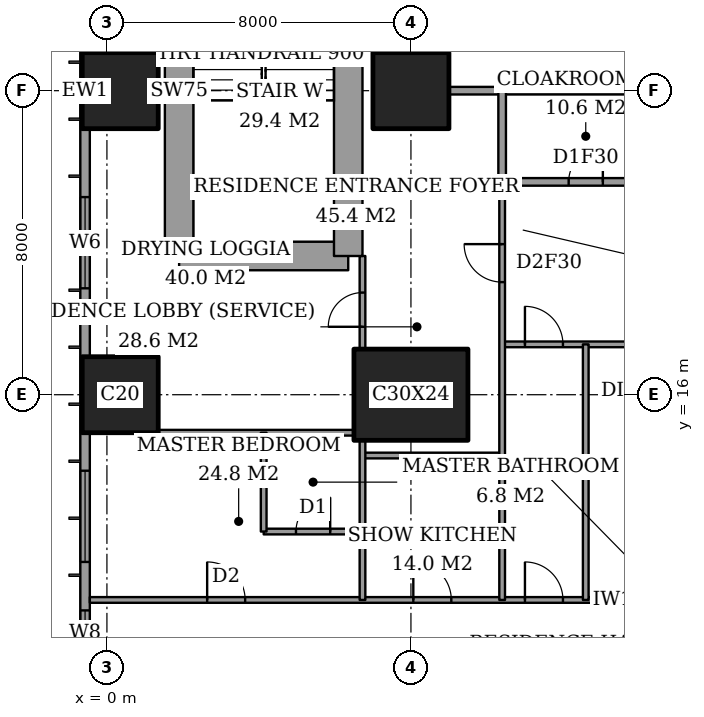
"""IFC4 building model, lengths in metres.
Left out: names, types, materials, properties, quantities, classifications, styles, units other than length and angle.
Written with IfcOpenShell. Run it as: python <this file> out.ifc"""

import sys

from ifc_helpers import new_model, si_unit, direction, frame, frame_2d, origin, origin_2d, place, context, subcontext, project, spatial, rectangle, extrude, element, fill, save


model = new_model("IFC4")
c1 = context("Model", 3, precision=1e-05, world=origin(), true_north=direction((0.0, 1.0)))
c2 = subcontext(c1, "Body", "Model", "MODEL_VIEW")
j1 = project(units=[si_unit("LENGTHUNIT", "METRE"), si_unit("PLANEANGLEUNIT", "RADIAN")], contexts=[c1])
p1 = place(None, origin())
s1 = spatial("IfcSite", under=j1, at=p1, CompositionType="ELEMENT")
p2 = place(p1, origin())
s2 = spatial("IfcBuilding", under=s1, at=p2, CompositionType="ELEMENT")
p3 = place(p2, frame((0.0, 0.0, 33.2)))
s3 = spatial("IfcBuildingStorey", under=s2, at=p3, CompositionType="ELEMENT", Elevation=33.2)
for number, where, z_axis, x_axis in (
    (1, (0.35, 16.0, 0.0), (0.0, 0.0, 1.0), (1.0, 0.0, 0.0)),
    (2, (0.35, 24.0, 0.0), (0.0, 0.0, 1.0), (1.0, 0.0, 0.0)),
):
    element("IfcColumn", number, at=place(p3, frame(where, z_axis=z_axis, x_axis=x_axis)), inside=s3, PredefinedType="COLUMN", context=c2, shape_type="SweptSolid", body=[
        extrude(rectangle(XDim=2.0, YDim=2.0, at=origin_2d()), origin(), (0.0, 0.0, 1.0), 3.6),
    ])
p4 = place(p3, frame((8.0, 16.0, 0.0), z_axis=(0.0, 0.0, 1.0), x_axis=(1.0, 0.0, 0.0)))
e3 = element("IfcColumn", 3, at=p4, inside=s3, PredefinedType="COLUMN", context=c2, shape_type="SweptSolid", body=[
    extrude(rectangle(XDim=3.0, YDim=2.4, at=origin_2d()), origin(), (0.0, 0.0, 1.0), 3.6),
])
p5 = place(p3, frame((8.0, 24.0, 0.0), z_axis=(0.0, 0.0, 1.0), x_axis=(1.0, 0.0, 0.0)))
e4 = element("IfcColumn", 4, at=p5, inside=s3, PredefinedType="COLUMN", context=c2, shape_type="SweptSolid", body=[
    extrude(rectangle(XDim=2.0, YDim=2.0, at=origin_2d()), origin(), (0.0, 0.0, 1.0), 3.6),
])
p6 = place(p3, frame((1.9, 19.65, 0.0), z_axis=(0.0, 0.0, 1.0), x_axis=(1.0, 0.0, 0.0)))
e5 = element("IfcWall", 5, at=p6, inside=s3, PredefinedType="SHEAR", context=c2, shape_type="SweptSolid", body=[
    extrude(rectangle(XDim=4.45, YDim=0.75, at=frame_2d((2.225, 0.0))), origin(), (0.0, 0.0, 1.0), 3.6),
])
p7 = place(p3, frame((6.35, 19.65, 0.0), z_axis=(0.0, 0.0, 1.0), x_axis=(0.0, 1.0, 0.0)))
e6 = element("IfcWall", 6, at=p7, inside=s3, PredefinedType="SHEAR", context=c2, shape_type="SweptSolid", body=[
    extrude(rectangle(XDim=8.7, YDim=0.75, at=frame_2d((4.35, 0.0))), origin(), (0.0, 0.0, 1.0), 3.6),
])
p8 = place(p7, frame((6.725, 0.0, 0.0)))
e7 = element("IfcOpeningElement", 7, at=p8, cuts=e6, PredefinedType="OPENING", context=c2, shape_type="SweptSolid", body=[
    extrude(rectangle(XDim=1.0, YDim=2.1, at=frame_2d((0.5, 1.05))), frame((0.0, 0.385, 0.0), z_axis=(0.0, -1.0, 0.0), x_axis=(1.0, 0.0, 0.0)), (0.0, 0.0, 1.0), 0.77),
])
p9 = place(p3, frame((1.9, 28.35, 0.0), z_axis=(0.0, 0.0, 1.0), x_axis=(0.0, -1.0, 0.0)))
e8 = element("IfcWall", 8, at=p9, inside=s3, PredefinedType="SHEAR", context=c2, shape_type="SweptSolid", body=[
    extrude(rectangle(XDim=8.7, YDim=0.75, at=frame_2d((4.35, 0.0))), origin(), (0.0, 0.0, 1.0), 3.6),
])
p10 = place(p3, frame((-0.575, 44.825, 0.0), z_axis=(0.0, 0.0, 1.0), x_axis=(0.0, -1.0, 0.0)))
e9 = element("IfcWall", 9, at=p10, inside=s3, PredefinedType="SOLIDWALL", context=c2, shape_type="SweptSolid", body=[
    extrude(rectangle(XDim=41.65, YDim=0.25, at=frame_2d((20.825, 0.0))), origin(), (0.0, 0.0, 1.0), 3.6),
])
p11 = place(p10, frame((0.775, 0.0, 0.6)))
e10 = element("IfcOpeningElement", 10, at=p11, cuts=e9, PredefinedType="OPENING", context=c2, shape_type="SweptSolid", body=[
    extrude(rectangle(XDim=2.4, YDim=2.0, at=frame_2d((1.2, 1.0))), frame((0.0, 0.135, 0.0), z_axis=(0.0, -1.0, 0.0), x_axis=(1.0, 0.0, 0.0)), (0.0, 0.0, 1.0), 0.27),
])
p12 = place(p10, frame((6.225, 0.0, 0.6)))
e11 = element("IfcOpeningElement", 11, at=p12, cuts=e9, PredefinedType="OPENING", context=c2, shape_type="SweptSolid", body=[
    extrude(rectangle(XDim=1.2, YDim=2.0, at=frame_2d((0.6, 1.0))), frame((0.0, 0.135, 0.0), z_axis=(0.0, -1.0, 0.0), x_axis=(1.0, 0.0, 0.0)), (0.0, 0.0, 1.0), 0.27),
])
p13 = place(p10, frame((8.625, 0.0, 0.6)))
e12 = element("IfcOpeningElement", 12, at=p13, cuts=e9, PredefinedType="OPENING", context=c2, shape_type="SweptSolid", body=[
    extrude(rectangle(XDim=2.4, YDim=2.0, at=frame_2d((1.2, 1.0))), frame((0.0, 0.135, 0.0), z_axis=(0.0, -1.0, 0.0), x_axis=(1.0, 0.0, 0.0)), (0.0, 0.0, 1.0), 0.27),
])
p14 = place(p10, frame((15.625, 0.0, 0.6)))
e13 = element("IfcOpeningElement", 13, at=p14, cuts=e9, PredefinedType="OPENING", context=c2, shape_type="SweptSolid", body=[
    extrude(rectangle(XDim=2.4, YDim=2.0, at=frame_2d((1.2, 1.0))), frame((0.0, 0.135, 0.0), z_axis=(0.0, -1.0, 0.0), x_axis=(1.0, 0.0, 0.0)), (0.0, 0.0, 1.0), 0.27),
])
p15 = place(p10, frame((23.625, 0.0, 0.6)))
e14 = element("IfcOpeningElement", 14, at=p15, cuts=e9, PredefinedType="OPENING", context=c2, shape_type="SweptSolid", body=[
    extrude(rectangle(XDim=2.4, YDim=2.0, at=frame_2d((1.2, 1.0))), frame((0.0, 0.135, 0.0), z_axis=(0.0, -1.0, 0.0), x_axis=(1.0, 0.0, 0.0)), (0.0, 0.0, 1.0), 0.27),
])
p16 = place(p10, frame((30.825, 0.0, 0.6)))
e15 = element("IfcOpeningElement", 15, at=p16, cuts=e9, PredefinedType="OPENING", context=c2, shape_type="SweptSolid", body=[
    extrude(rectangle(XDim=2.4, YDim=2.0, at=frame_2d((1.2, 1.0))), frame((0.0, 0.135, 0.0), z_axis=(0.0, -1.0, 0.0), x_axis=(1.0, 0.0, 0.0)), (0.0, 0.0, 1.0), 0.27),
])
p17 = place(p10, frame((34.5, 0.0, 0.6)))
e16 = element("IfcOpeningElement", 16, at=p17, cuts=e9, PredefinedType="OPENING", context=c2, shape_type="SweptSolid", body=[
    extrude(rectangle(XDim=1.2, YDim=2.0, at=frame_2d((0.6, 1.0))), frame((0.0, 0.135, 0.0), z_axis=(0.0, -1.0, 0.0), x_axis=(1.0, 0.0, 0.0)), (0.0, 0.0, 1.0), 0.27),
])
p18 = place(p10, frame((38.475, 0.0, 0.6)))
e17 = element("IfcOpeningElement", 17, at=p18, cuts=e9, PredefinedType="OPENING", context=c2, shape_type="SweptSolid", body=[
    extrude(rectangle(XDim=2.4, YDim=2.0, at=frame_2d((1.2, 1.0))), frame((0.0, 0.135, 0.0), z_axis=(0.0, -1.0, 0.0), x_axis=(1.0, 0.0, 0.0)), (0.0, 0.0, 1.0), 0.27),
])
p19 = place(p3, frame((-0.45, 10.6, 0.0), z_axis=(0.0, 0.0, 1.0), x_axis=(1.0, 0.0, 0.0)))
e18 = element("IfcWall", 18, at=p19, inside=s3, PredefinedType="PARTITIONING", context=c2, shape_type="SweptSolid", body=[
    extrude(rectangle(XDim=25.011, YDim=0.15, at=frame_2d((12.505, 0.0))), origin(), (0.0, 0.0, 1.0), 3.35),
])
p20 = place(p19, frame((11.45, 0.0, 0.0)))
e19 = element("IfcOpeningElement", 19, at=p20, cuts=e18, PredefinedType="OPENING", context=c2, shape_type="SweptSolid", body=[
    extrude(rectangle(XDim=1.0, YDim=2.1, at=frame_2d((0.5, 1.05))), frame((0.0, 0.085, 0.0), z_axis=(0.0, -1.0, 0.0), x_axis=(1.0, 0.0, 0.0)), (0.0, 0.0, 1.0), 0.17),
])
p21 = place(p19, frame((3.087, 0.0, 0.0)))
e20 = element("IfcOpeningElement", 20, at=p21, cuts=e18, PredefinedType="OPENING", context=c2, shape_type="SweptSolid", body=[
    extrude(rectangle(XDim=1.0, YDim=2.1, at=frame_2d((0.5, 1.05))), frame((0.0, 0.085, 0.0), z_axis=(0.0, -1.0, 0.0), x_axis=(1.0, 0.0, 0.0)), (0.0, 0.0, 1.0), 0.17),
])
p22 = place(p19, frame((8.512, 0.0, 0.0)))
e21 = element("IfcOpeningElement", 21, at=p22, cuts=e18, PredefinedType="OPENING", context=c2, shape_type="SweptSolid", body=[
    extrude(rectangle(XDim=1.0, YDim=2.1, at=frame_2d((0.5, 1.05))), frame((0.0, 0.085, 0.0), z_axis=(0.0, -1.0, 0.0), x_axis=(1.0, 0.0, 0.0)), (0.0, 0.0, 1.0), 0.17),
])
p23 = place(p19, frame((15.25, 0.0, 0.0)))
e22 = element("IfcOpeningElement", 22, at=p23, cuts=e18, PredefinedType="OPENING", context=c2, shape_type="SweptSolid", body=[
    extrude(rectangle(XDim=1.0, YDim=2.1, at=frame_2d((0.5, 1.05))), frame((0.0, 0.085, 0.0), z_axis=(0.0, -1.0, 0.0), x_axis=(1.0, 0.0, 0.0)), (0.0, 0.0, 1.0), 0.17),
])
p24 = place(p19, frame((21.175, 0.0, 0.0)))
e23 = element("IfcOpeningElement", 23, at=p24, cuts=e18, PredefinedType="OPENING", context=c2, shape_type="SweptSolid", body=[
    extrude(rectangle(XDim=1.0, YDim=2.1, at=frame_2d((0.5, 1.05))), frame((0.0, 0.085, 0.0), z_axis=(0.0, -1.0, 0.0), x_axis=(1.0, 0.0, 0.0)), (0.0, 0.0, 1.0), 0.17),
])
p25 = place(p3, frame((4.125, 12.4, 0.0), z_axis=(0.0, 0.0, 1.0), x_axis=(1.0, 0.0, 0.0)))
e24 = element("IfcWall", 24, at=p25, inside=s3, PredefinedType="PARTITIONING", context=c2, shape_type="SweptSolid", body=[
    extrude(rectangle(XDim=2.6, YDim=0.15, at=frame_2d((1.3, 0.0))), origin(), (0.0, 0.0, 1.0), 3.35),
])
p26 = place(p25, frame((0.85, 0.0, 0.0)))
e25 = element("IfcOpeningElement", 25, at=p26, cuts=e24, PredefinedType="OPENING", context=c2, shape_type="SweptSolid", body=[
    extrude(rectangle(XDim=0.9, YDim=2.1, at=frame_2d((0.45, 1.05))), frame((0.0, 0.085, 0.0), z_axis=(0.0, -1.0, 0.0), x_axis=(1.0, 0.0, 0.0)), (0.0, 0.0, 1.0), 0.17),
])
p27 = place(p3, frame((6.725, 14.4, 0.0), z_axis=(0.0, 0.0, 1.0), x_axis=(1.0, 0.0, 0.0)))
e26 = element("IfcWall", 26, at=p27, inside=s3, PredefinedType="PARTITIONING", context=c2, shape_type="SweptSolid", body=[
    extrude(rectangle(XDim=3.675, YDim=0.15, at=frame_2d((1.837, 0.0))), origin(), (0.0, 0.0, 1.0), 3.35),
])
p28 = place(p3, frame((1.35, 15.0, 0.0), z_axis=(0.0, 0.0, 1.0), x_axis=(1.0, 0.0, 0.0)))
e27 = element("IfcWall", 27, at=p28, inside=s3, PredefinedType="PARTITIONING", context=c2, shape_type="SweptSolid", body=[
    extrude(rectangle(XDim=5.15, YDim=0.15, at=frame_2d((2.575, 0.0))), origin(), (0.0, 0.0, 1.0), 3.35),
])
p29 = place(p3, frame((10.4, 17.325, 0.0), z_axis=(0.0, 0.0, 1.0), x_axis=(1.0, 0.0, 0.0)))
e28 = element("IfcWall", 28, at=p29, inside=s3, PredefinedType="PARTITIONING", context=c2, shape_type="SweptSolid", body=[
    extrude(rectangle(XDim=4.0, YDim=0.15, at=frame_2d((2.0, 0.0))), origin(), (0.0, 0.0, 1.0), 3.35),
])
p30 = place(p29, frame((0.6, 0.0, 0.0)))
e29 = element("IfcOpeningElement", 29, at=p30, cuts=e28, PredefinedType="OPENING", context=c2, shape_type="SweptSolid", body=[
    extrude(rectangle(XDim=1.0, YDim=2.1, at=frame_2d((0.5, 1.05))), frame((0.0, 0.085, 0.0), z_axis=(0.0, -1.0, 0.0), x_axis=(1.0, 0.0, 0.0)), (0.0, 0.0, 1.0), 0.17),
])
p31 = place(p3, frame((10.4, 21.6, 0.0), z_axis=(0.0, 0.0, 1.0), x_axis=(1.0, 0.0, 0.0)))
e30 = element("IfcWall", 30, at=p31, inside=s3, PredefinedType="PARTITIONING", context=c2, shape_type="SweptSolid", body=[
    extrude(rectangle(XDim=4.4, YDim=0.2, at=frame_2d((2.2, 0.0))), origin(), (0.0, 0.0, 1.0), 3.35),
])
p32 = place(p31, frame((1.75, 0.0, 0.0)))
e31 = element("IfcOpeningElement", 31, at=p32, cuts=e30, PredefinedType="OPENING", context=c2, shape_type="SweptSolid", body=[
    extrude(rectangle(XDim=0.9, YDim=2.1, at=frame_2d((0.45, 1.05))), frame((0.0, 0.11, 0.0), z_axis=(0.0, -1.0, 0.0), x_axis=(1.0, 0.0, 0.0)), (0.0, 0.0, 1.0), 0.22),
])
p33 = place(p3, frame((9.0, 24.0, 0.0), z_axis=(0.0, 0.0, 1.0), x_axis=(1.0, 0.0, 0.0)))
e32 = element("IfcWall", 32, at=p33, inside=s3, PredefinedType="PARTITIONING", context=c2, shape_type="SweptSolid", body=[
    extrude(rectangle(XDim=6.0, YDim=0.2, at=frame_2d((3.0, 0.0))), origin(), (0.0, 0.0, 1.0), 3.35),
])
p34 = place(p3, frame((4.125, 12.4, 0.0), z_axis=(0.0, 0.0, 1.0), x_axis=(0.0, 1.0, 0.0)))
e33 = element("IfcWall", 33, at=p34, inside=s3, PredefinedType="PARTITIONING", context=c2, shape_type="SweptSolid", body=[
    extrude(rectangle(XDim=2.6, YDim=0.15, at=frame_2d((1.3, 0.0))), origin(), (0.0, 0.0, 1.0), 3.35),
])
p35 = place(p3, frame((6.725, 10.6, 0.0), z_axis=(0.0, 0.0, 1.0), x_axis=(0.0, 1.0, 0.0)))
e34 = element("IfcWall", 34, at=p35, inside=s3, PredefinedType="PARTITIONING", context=c2, shape_type="SweptSolid", body=[
    extrude(rectangle(XDim=4.2, YDim=0.15, at=frame_2d((2.1, 0.0))), origin(), (0.0, 0.0, 1.0), 3.35),
])
p36 = place(p3, frame((6.725, 17.2, 0.0), z_axis=(0.0, 0.0, 1.0), x_axis=(0.0, 1.0, 0.0)))
e35 = element("IfcWall", 35, at=p36, inside=s3, PredefinedType="PARTITIONING", context=c2, shape_type="SweptSolid", body=[
    extrude(rectangle(XDim=2.45, YDim=0.15, at=frame_2d((1.225, 0.0))), origin(), (0.0, 0.0, 1.0), 3.35),
])
p37 = place(p36, frame((0.587, 0.0, 0.0)))
e36 = element("IfcOpeningElement", 36, at=p37, cuts=e35, PredefinedType="OPENING", context=c2, shape_type="SweptSolid", body=[
    extrude(rectangle(XDim=0.9, YDim=2.1, at=frame_2d((0.45, 1.05))), frame((0.0, 0.085, 0.0), z_axis=(0.0, -1.0, 0.0), x_axis=(1.0, 0.0, 0.0)), (0.0, 0.0, 1.0), 0.17),
])
p38 = place(p3, frame((10.4, 21.6, 0.0), z_axis=(0.0, 0.0, 1.0), x_axis=(0.0, 1.0, 0.0)))
e37 = element("IfcWall", 37, at=p38, inside=s3, PredefinedType="PARTITIONING", context=c2, shape_type="SweptSolid", body=[
    extrude(rectangle(XDim=2.4, YDim=0.2, at=frame_2d((1.2, 0.0))), origin(), (0.0, 0.0, 1.0), 3.35),
])
p39 = place(p3, frame((10.4, 10.6, 0.0), z_axis=(0.0, 0.0, 1.0), x_axis=(0.0, 1.0, 0.0)))
e38 = element("IfcWall", 38, at=p39, inside=s3, PredefinedType="PARTITIONING", context=c2, shape_type="SweptSolid", body=[
    extrude(rectangle(XDim=11.0, YDim=0.15, at=frame_2d((5.5, 0.0))), origin(), (0.0, 0.0, 1.0), 3.35),
])
p40 = place(p39, frame((8.363, 0.0, 0.0)))
e39 = element("IfcOpeningElement", 39, at=p40, cuts=e38, PredefinedType="OPENING", context=c2, shape_type="SweptSolid", body=[
    extrude(rectangle(XDim=1.0, YDim=2.1, at=frame_2d((0.5, 1.05))), frame((0.0, 0.085, 0.0), z_axis=(0.0, -1.0, 0.0), x_axis=(1.0, 0.0, 0.0)), (0.0, 0.0, 1.0), 0.17),
])
p41 = place(p3, frame((12.6, 10.6, 0.0), z_axis=(0.0, 0.0, 1.0), x_axis=(0.0, 1.0, 0.0)))
e40 = element("IfcWall", 40, at=p41, inside=s3, PredefinedType="PARTITIONING", context=c2, shape_type="SweptSolid", body=[
    extrude(rectangle(XDim=6.725, YDim=0.15, at=frame_2d((3.362, 0.0))), origin(), (0.0, 0.0, 1.0), 3.35),
])
p42 = place(p15, origin())
e41 = element("IfcWindow", 41, at=p42, inside=s3, PartitioningType="SINGLE_PANEL", PredefinedType="WINDOW", context=c2, shape_type="SweptSolid", body=[
    extrude(rectangle(XDim=2.4, YDim=2.0, at=frame_2d((1.2, 1.0))), frame((0.0, 0.03, 0.0), z_axis=(0.0, -1.0, 0.0), x_axis=(1.0, 0.0, 0.0)), (0.0, 0.0, 1.0), 0.06),
])
fill(e14, e41)
p43 = place(p16, origin())
e42 = element("IfcWindow", 42, at=p43, inside=s3, PartitioningType="SINGLE_PANEL", PredefinedType="WINDOW", context=c2, shape_type="SweptSolid", body=[
    extrude(rectangle(XDim=2.4, YDim=2.0, at=frame_2d((1.2, 1.0))), frame((0.0, 0.03, 0.0), z_axis=(0.0, -1.0, 0.0), x_axis=(1.0, 0.0, 0.0)), (0.0, 0.0, 1.0), 0.06),
])
fill(e15, e42)
p44 = place(p17, origin())
e43 = element("IfcWindow", 43, at=p44, inside=s3, PartitioningType="SINGLE_PANEL", PredefinedType="WINDOW", context=c2, shape_type="SweptSolid", body=[
    extrude(rectangle(XDim=1.2, YDim=2.0, at=frame_2d((0.6, 1.0))), frame((0.0, 0.03, 0.0), z_axis=(0.0, -1.0, 0.0), x_axis=(1.0, 0.0, 0.0)), (0.0, 0.0, 1.0), 0.06),
])
fill(e16, e43)
p45 = place(p20, origin())
e44 = element("IfcDoor", 44, at=p45, inside=s3, OperationType="SINGLE_SWING_RIGHT", PredefinedType="DOOR", context=c2, shape_type="SweptSolid", body=[
    extrude(rectangle(XDim=1.0, YDim=2.1, at=frame_2d((0.5, 1.05))), frame((0.0, 0.025, 0.0), z_axis=(0.0, -1.0, 0.0), x_axis=(1.0, 0.0, 0.0)), (0.0, 0.0, 1.0), 0.05),
])
fill(e19, e44)
p46 = place(p26, origin())
e45 = element("IfcDoor", 45, at=p46, inside=s3, OperationType="SINGLE_SWING_LEFT", PredefinedType="DOOR", context=c2, shape_type="SweptSolid", body=[
    extrude(rectangle(XDim=0.9, YDim=2.1, at=frame_2d((0.45, 1.05))), frame((0.0, 0.025, 0.0), z_axis=(0.0, -1.0, 0.0), x_axis=(1.0, 0.0, 0.0)), (0.0, 0.0, 1.0), 0.05),
])
fill(e25, e45)
p47 = place(p21, origin())
e46 = element("IfcDoor", 46, at=p47, inside=s3, OperationType="SINGLE_SWING_RIGHT", PredefinedType="DOOR", context=c2, shape_type="SweptSolid", body=[
    extrude(rectangle(XDim=1.0, YDim=2.1, at=frame_2d((0.5, 1.05))), frame((0.0, 0.025, 0.0), z_axis=(0.0, -1.0, 0.0), x_axis=(1.0, 0.0, 0.0)), (0.0, 0.0, 1.0), 0.05),
])
fill(e20, e46)
p48 = place(p37, origin())
e47 = element("IfcDoor", 47, at=p48, inside=s3, OperationType="SINGLE_SWING_RIGHT", PredefinedType="DOOR", context=c2, shape_type="SweptSolid", body=[
    extrude(rectangle(XDim=0.9, YDim=2.1, at=frame_2d((0.45, 1.05))), frame((0.0, 0.025, 0.0), z_axis=(0.0, -1.0, 0.0), x_axis=(1.0, 0.0, 0.0)), (0.0, 0.0, 1.0), 0.05),
])
fill(e36, e47)
p49 = place(p22, origin())
e48 = element("IfcDoor", 48, at=p49, inside=s3, OperationType="SINGLE_SWING_RIGHT", PredefinedType="DOOR", context=c2, shape_type="SweptSolid", body=[
    extrude(rectangle(XDim=1.0, YDim=2.1, at=frame_2d((0.5, 1.05))), frame((0.0, 0.025, 0.0), z_axis=(0.0, -1.0, 0.0), x_axis=(1.0, 0.0, 0.0)), (0.0, 0.0, 1.0), 0.05),
])
fill(e21, e48)
p50 = place(p40, origin())
e49 = element("IfcDoor", 49, at=p50, inside=s3, OperationType="SINGLE_SWING_LEFT", PredefinedType="DOOR", context=c2, shape_type="SweptSolid", body=[
    extrude(rectangle(XDim=1.0, YDim=2.1, at=frame_2d((0.5, 1.05))), frame((0.0, 0.025, 0.0), z_axis=(0.0, -1.0, 0.0), x_axis=(1.0, 0.0, 0.0)), (0.0, 0.0, 1.0), 0.05),
])
fill(e39, e49)
p51 = place(p32, origin())
e50 = element("IfcDoor", 50, at=p51, inside=s3, OperationType="SINGLE_SWING_LEFT", PredefinedType="DOOR", context=c2, shape_type="SweptSolid", body=[
    extrude(rectangle(XDim=0.9, YDim=2.1, at=frame_2d((0.45, 1.05))), frame((0.0, 0.025, 0.0), z_axis=(0.0, -1.0, 0.0), x_axis=(1.0, 0.0, 0.0)), (0.0, 0.0, 1.0), 0.05),
])
fill(e31, e50)
p52 = place(p30, origin())
e51 = element("IfcDoor", 51, at=p52, inside=s3, OperationType="SINGLE_SWING_RIGHT", PredefinedType="DOOR", context=c2, shape_type="SweptSolid", body=[
    extrude(rectangle(XDim=1.0, YDim=2.1, at=frame_2d((0.5, 1.05))), frame((0.0, 0.025, 0.0), z_axis=(0.0, -1.0, 0.0), x_axis=(1.0, 0.0, 0.0)), (0.0, 0.0, 1.0), 0.05),
])
fill(e29, e51)
save(model, sys.argv[1])
